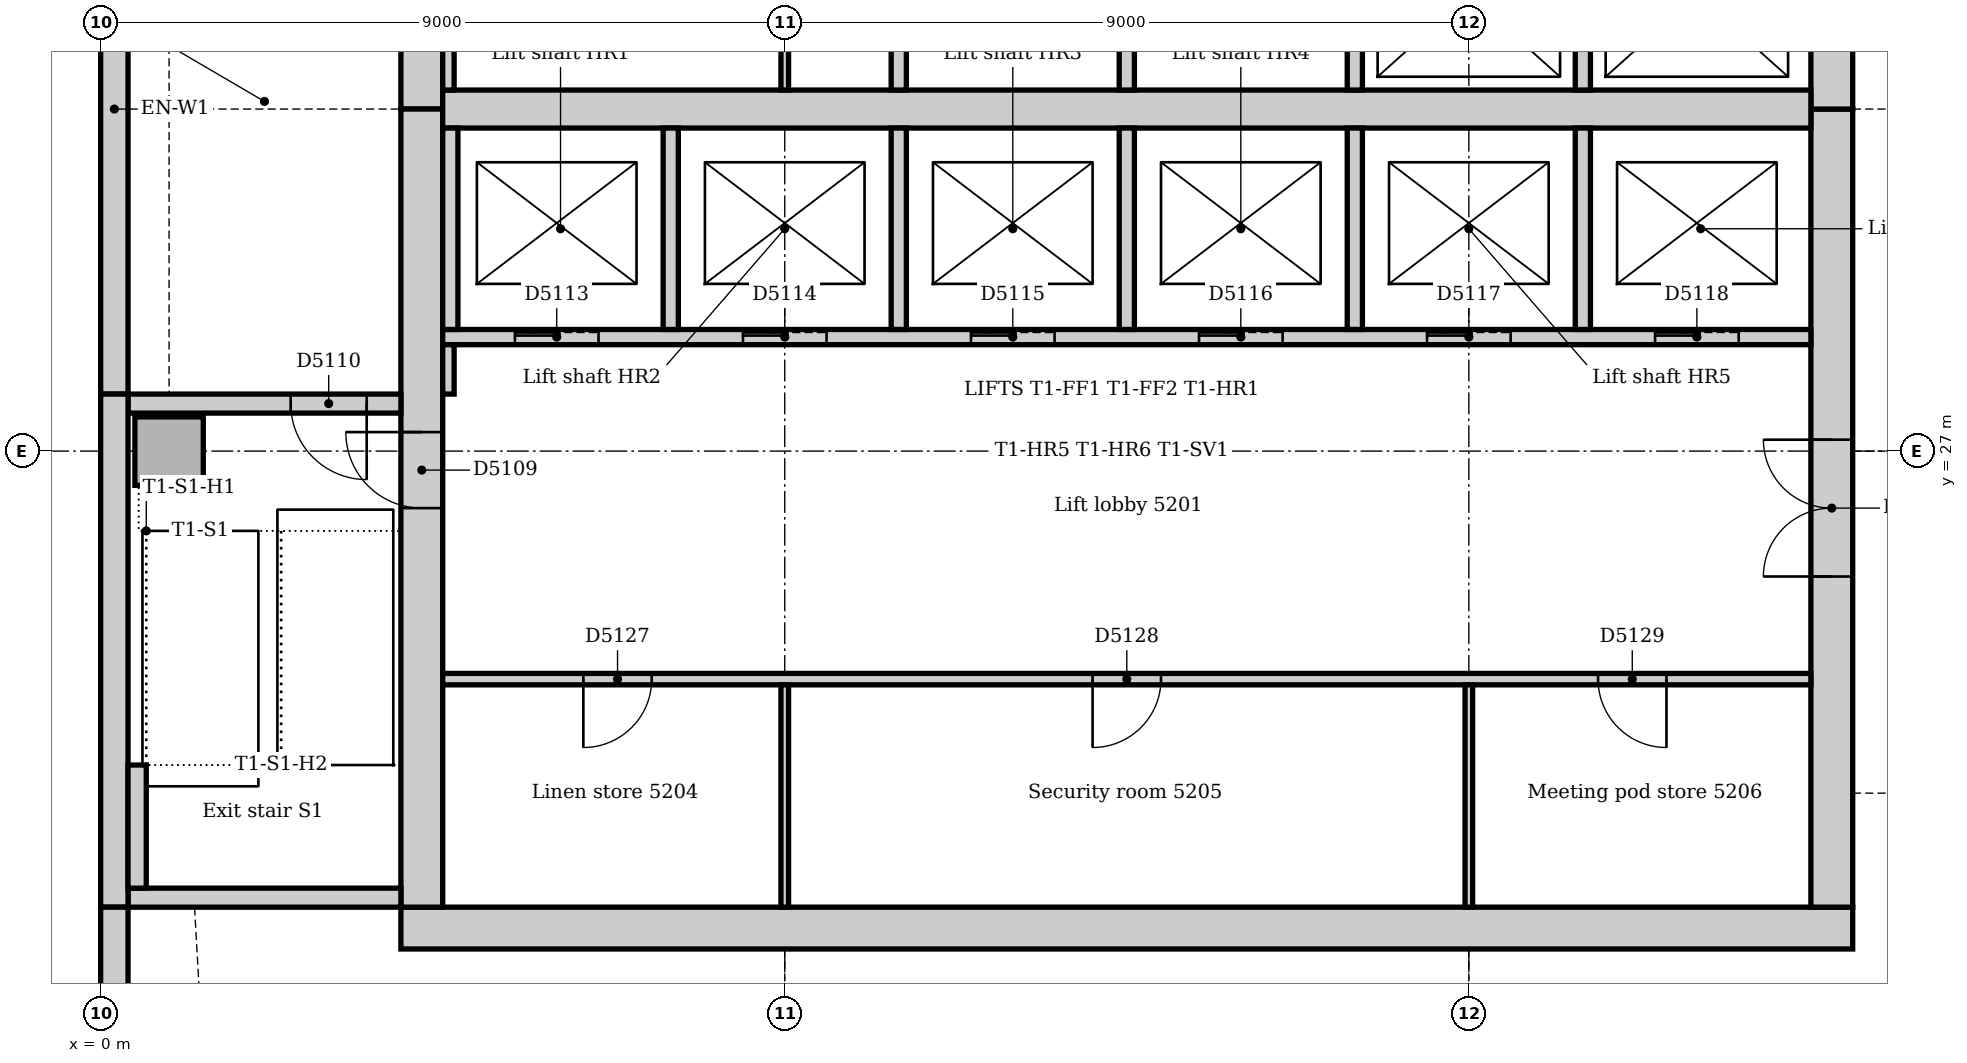
"""IFC4 building model, lengths in metres.
Left out: names, types, materials, properties, quantities, classifications, styles, units other than length and angle.
Written with IfcOpenShell. Run it as: python <this file> out.ifc"""

import sys

from ifc_helpers import new_model, si_unit, direction, frame, frame_2d, origin, origin_2d, place, context, subcontext, project, spatial, rectangle, extrude, element, fill, save


model = new_model("IFC4")
c1 = context("Model", 3, precision=1e-05, world=origin(), true_north=direction((0.0, 1.0)))
c2 = subcontext(c1, "Body", "Model", "MODEL_VIEW")
j1 = project(units=[si_unit("LENGTHUNIT", "METRE"), si_unit("PLANEANGLEUNIT", "RADIAN")], contexts=[c1])
p1 = place(None, origin())
s1 = spatial("IfcSite", under=j1, at=p1, CompositionType="ELEMENT")
p2 = place(p1, origin())
s2 = spatial("IfcBuilding", under=s1, at=p2, CompositionType="ELEMENT")
p3 = place(p2, frame((0.0, 0.0, 218.0)))
s3 = spatial("IfcBuildingStorey", under=s2, at=p3, CompositionType="ELEMENT", Elevation=218.0)
p4 = place(p3, frame((3.95, 20.725, 0.0), z_axis=(0.0, 0.0, 1.0), x_axis=(1.0, 0.0, 0.0)))
e1 = element("IfcWall", 1, at=p4, inside=s3, PredefinedType="SOLIDWALL", context=c2, shape_type="SweptSolid", body=[
    extrude(rectangle(XDim=19.1, YDim=0.55, at=frame_2d((9.55, 0.0))), origin(), (0.0, 0.0, 1.0), 4.0),
])
p5 = place(p3, frame((22.775, 21.0, 0.0), z_axis=(0.0, 0.0, 1.0), x_axis=(0.0, 1.0, 0.0)))
e2 = element("IfcWall", 2, at=p5, inside=s3, PredefinedType="SOLIDWALL", context=c2, shape_type="SweptSolid", body=[
    extrude(rectangle(XDim=10.5, YDim=0.55, at=frame_2d((5.25, 0.0))), origin(), (0.0, 0.0, 1.0), 4.0),
])
p6 = place(p5, frame((4.35, 0.0, 0.0)))
e3 = element("IfcOpeningElement", 3, at=p6, cuts=e2, PredefinedType="OPENING", context=c2, shape_type="SweptSolid", body=[
    extrude(rectangle(XDim=1.8, YDim=2.1, at=frame_2d((0.9, 1.05))), frame((0.0, 0.285, 0.0), z_axis=(0.0, -1.0, 0.0), x_axis=(1.0, 0.0, 0.0)), (0.0, 0.0, 1.0), 0.57),
])
p7 = place(p3, frame((22.775, 31.5, 0.0), z_axis=(0.0, 0.0, 1.0), x_axis=(0.0, 1.0, 0.0)))
e4 = element("IfcWall", 4, at=p7, inside=s3, PredefinedType="SOLIDWALL", context=c2, shape_type="SweptSolid", body=[
    extrude(rectangle(XDim=10.5, YDim=0.55, at=frame_2d((5.25, 0.0))), origin(), (0.0, 0.0, 1.0), 4.0),
])
p8 = place(p7, frame((3.15, 0.0, 0.0)))
e5 = element("IfcOpeningElement", 5, at=p8, cuts=e4, PredefinedType="OPENING", context=c2, shape_type="SweptSolid", body=[
    extrude(rectangle(XDim=1.0, YDim=2.1, at=frame_2d((0.5, 1.05))), frame((0.0, 0.285, 0.0), z_axis=(0.0, -1.0, 0.0), x_axis=(1.0, 0.0, 0.0)), (0.0, 0.0, 1.0), 0.57),
])
p9 = place(p7, frame((5.2, 0.0, 0.0)))
e6 = element("IfcOpeningElement", 6, at=p9, cuts=e4, PredefinedType="OPENING", context=c2, shape_type="SweptSolid", body=[
    extrude(rectangle(XDim=1.0, YDim=2.1, at=frame_2d((0.5, 1.05))), frame((0.0, 0.285, 0.0), z_axis=(0.0, -1.0, 0.0), x_axis=(1.0, 0.0, 0.0)), (0.0, 0.0, 1.0), 0.57),
])
p10 = place(p3, frame((4.225, 42.0, 0.0), z_axis=(0.0, 0.0, 1.0), x_axis=(0.0, -1.0, 0.0)))
e7 = element("IfcWall", 7, at=p10, inside=s3, PredefinedType="SOLIDWALL", context=c2, shape_type="SweptSolid", body=[
    extrude(rectangle(XDim=10.5, YDim=0.55, at=frame_2d((5.25, 0.0))), origin(), (0.0, 0.0, 1.0), 4.0),
])
p11 = place(p10, frame((5.3, 0.0, 0.0)))
e8 = element("IfcOpeningElement", 8, at=p11, cuts=e7, PredefinedType="OPENING", context=c2, shape_type="SweptSolid", body=[
    extrude(rectangle(XDim=1.0, YDim=2.1, at=frame_2d((0.5, 1.05))), frame((0.0, 0.285, 0.0), z_axis=(0.0, -1.0, 0.0), x_axis=(1.0, 0.0, 0.0)), (0.0, 0.0, 1.0), 0.57),
])
p12 = place(p3, frame((4.225, 31.5, 0.0), z_axis=(0.0, 0.0, 1.0), x_axis=(0.0, -1.0, 0.0)))
e9 = element("IfcWall", 9, at=p12, inside=s3, PredefinedType="SOLIDWALL", context=c2, shape_type="SweptSolid", body=[
    extrude(rectangle(XDim=10.5, YDim=0.55, at=frame_2d((5.25, 0.0))), origin(), (0.0, 0.0, 1.0), 4.0),
])
p13 = place(p12, frame((4.25, 0.0, 0.0)))
e10 = element("IfcOpeningElement", 10, at=p13, cuts=e9, PredefinedType="OPENING", context=c2, shape_type="SweptSolid", body=[
    extrude(rectangle(XDim=1.0, YDim=2.1, at=frame_2d((0.5, 1.05))), frame((0.0, 0.285, 0.0), z_axis=(0.0, -1.0, 0.0), x_axis=(1.0, 0.0, 0.0)), (0.0, 0.0, 1.0), 0.57),
])
p14 = place(p3, frame((4.5, 31.5, 0.0), z_axis=(0.0, 0.0, 1.0), x_axis=(1.0, 0.0, 0.0)))
e11 = element("IfcWall", 11, at=p14, inside=s3, PredefinedType="SOLIDWALL", context=c2, shape_type="SweptSolid", body=[
    extrude(rectangle(XDim=18.0, YDim=0.5, at=frame_2d((9.0, 0.0))), origin(), (0.0, 0.0, 1.0), 4.0),
])
p15 = place(p3, frame((0.36, 21.125, 0.0), z_axis=(0.0, 0.0, 1.0), x_axis=(1.0, 0.0, 0.0)))
e12 = element("IfcWall", 12, at=p15, inside=s3, PredefinedType="SOLIDWALL", context=c2, shape_type="SweptSolid", body=[
    extrude(rectangle(XDim=3.59, YDim=0.25, at=frame_2d((1.795, 0.0))), origin(), (0.0, 0.0, 1.0), 4.0),
])
p16 = place(p3, frame((3.95, 27.625, 0.0), z_axis=(0.0, 0.0, 1.0), x_axis=(-1.0, 0.0, 0.0)))
e13 = element("IfcWall", 13, at=p16, inside=s3, PredefinedType="SOLIDWALL", context=c2, shape_type="SweptSolid", body=[
    extrude(rectangle(XDim=3.59, YDim=0.25, at=frame_2d((1.795, 0.0))), origin(), (0.0, 0.0, 1.0), 4.0),
])
p17 = place(p16, frame((0.45, 0.0, 0.0)))
e14 = element("IfcOpeningElement", 14, at=p17, cuts=e13, PredefinedType="OPENING", context=c2, shape_type="SweptSolid", body=[
    extrude(rectangle(XDim=1.0, YDim=2.1, at=frame_2d((0.5, 1.05))), frame((0.0, 0.135, 0.0), z_axis=(0.0, -1.0, 0.0), x_axis=(1.0, 0.0, 0.0)), (0.0, 0.0, 1.0), 0.27),
])
p18 = place(p3, frame((0.9, 27.0, 0.0), z_axis=(0.0, 0.0, 1.0), x_axis=(1.0, 0.0, 0.0)))
e15 = element("IfcColumn", 15, at=p18, inside=s3, PredefinedType="COLUMN", context=c2, shape_type="SweptSolid", body=[
    extrude(rectangle(XDim=0.9, YDim=0.9, at=origin_2d()), origin(), (0.0, 0.0, 1.0), 4.0),
])
p19 = place(p3, frame((0.18, 35.25, 0.0), z_axis=(0.0, 0.0, 1.0), x_axis=(0.0, -1.0, 0.0)))
e16 = element("IfcWall", 16, at=p19, inside=s3, PredefinedType="STANDARD", context=c2, shape_type="SweptSolid", body=[
    extrude(rectangle(XDim=7.5, YDim=0.36, at=frame_2d((3.75, 0.0))), origin(), (0.0, 0.0, 1.0), 3.85),
])
p20 = place(p3, frame((0.18, 27.75, 0.0), z_axis=(0.0, 0.0, 1.0), x_axis=(0.0, -1.0, 0.0)))
e17 = element("IfcWall", 17, at=p20, inside=s3, PredefinedType="STANDARD", context=c2, shape_type="SweptSolid", body=[
    extrude(rectangle(XDim=6.75, YDim=0.36, at=frame_2d((3.375, 0.0))), origin(), (0.0, 0.0, 1.0), 3.85),
])
p21 = place(p3, frame((0.18, 21.0, 0.0), z_axis=(0.0, 0.0, 1.0), x_axis=(0.0, -1.0, 0.0)))
e18 = element("IfcWall", 18, at=p21, inside=s3, PredefinedType="STANDARD", context=c2, shape_type="SweptSolid", body=[
    extrude(rectangle(XDim=3.257, YDim=0.36, at=frame_2d((1.629, 0.0))), origin(), (0.0, 0.0, 1.0), 3.85),
])
p22 = place(p3, frame((0.48, 21.25, 0.0), z_axis=(0.0, 0.0, 1.0), x_axis=(0.0, 1.0, 0.0)))
e19 = element("IfcWall", 19, at=p22, inside=s3, PredefinedType="STANDARD", context=c2, shape_type="SweptSolid", body=[
    extrude(rectangle(XDim=1.62, YDim=0.24, at=frame_2d((0.81, 0.0))), origin(), (0.0, 0.0, 1.0), 4.0),
])
p23 = place(p3, frame((4.5, 28.5, 0.0), z_axis=(0.0, 0.0, 1.0), x_axis=(1.0, 0.0, 0.0)))
e20 = element("IfcWall", 20, at=p23, inside=s3, PredefinedType="PARTITIONING", context=c2, shape_type="SweptSolid", body=[
    extrude(rectangle(XDim=18.0, YDim=0.2, at=frame_2d((9.0, 0.0))), origin(), (0.0, 0.0, 1.0), 3.85),
])
p24 = place(p23, frame((0.95, 0.0, 0.0)))
e21 = element("IfcOpeningElement", 21, at=p24, cuts=e20, PredefinedType="OPENING", context=c2, shape_type="SweptSolid", body=[
    extrude(rectangle(XDim=1.1, YDim=2.1, at=frame_2d((0.55, 1.05))), frame((0.0, 0.11, 0.0), z_axis=(0.0, -1.0, 0.0), x_axis=(1.0, 0.0, 0.0)), (0.0, 0.0, 1.0), 0.22),
])
p25 = place(p23, frame((3.95, 0.0, 0.0)))
e22 = element("IfcOpeningElement", 22, at=p25, cuts=e20, PredefinedType="OPENING", context=c2, shape_type="SweptSolid", body=[
    extrude(rectangle(XDim=1.1, YDim=2.1, at=frame_2d((0.55, 1.05))), frame((0.0, 0.11, 0.0), z_axis=(0.0, -1.0, 0.0), x_axis=(1.0, 0.0, 0.0)), (0.0, 0.0, 1.0), 0.22),
])
p26 = place(p23, frame((6.95, 0.0, 0.0)))
e23 = element("IfcOpeningElement", 23, at=p26, cuts=e20, PredefinedType="OPENING", context=c2, shape_type="SweptSolid", body=[
    extrude(rectangle(XDim=1.1, YDim=2.1, at=frame_2d((0.55, 1.05))), frame((0.0, 0.11, 0.0), z_axis=(0.0, -1.0, 0.0), x_axis=(1.0, 0.0, 0.0)), (0.0, 0.0, 1.0), 0.22),
])
p27 = place(p23, frame((9.95, 0.0, 0.0)))
e24 = element("IfcOpeningElement", 24, at=p27, cuts=e20, PredefinedType="OPENING", context=c2, shape_type="SweptSolid", body=[
    extrude(rectangle(XDim=1.1, YDim=2.1, at=frame_2d((0.55, 1.05))), frame((0.0, 0.11, 0.0), z_axis=(0.0, -1.0, 0.0), x_axis=(1.0, 0.0, 0.0)), (0.0, 0.0, 1.0), 0.22),
])
p28 = place(p23, frame((12.95, 0.0, 0.0)))
e25 = element("IfcOpeningElement", 25, at=p28, cuts=e20, PredefinedType="OPENING", context=c2, shape_type="SweptSolid", body=[
    extrude(rectangle(XDim=1.1, YDim=2.1, at=frame_2d((0.55, 1.05))), frame((0.0, 0.11, 0.0), z_axis=(0.0, -1.0, 0.0), x_axis=(1.0, 0.0, 0.0)), (0.0, 0.0, 1.0), 0.22),
])
p29 = place(p23, frame((15.95, 0.0, 0.0)))
e26 = element("IfcOpeningElement", 26, at=p29, cuts=e20, PredefinedType="OPENING", context=c2, shape_type="SweptSolid", body=[
    extrude(rectangle(XDim=1.1, YDim=2.1, at=frame_2d((0.55, 1.05))), frame((0.0, 0.11, 0.0), z_axis=(0.0, -1.0, 0.0), x_axis=(1.0, 0.0, 0.0)), (0.0, 0.0, 1.0), 0.22),
])
for number, where, z_axis, x_axis in (
    (27, (10.5, 28.6, 0.0), (0.0, 0.0, 1.0), (0.0, 1.0, 0.0)),
    (28, (10.5, 31.75, 0.0), (0.0, 0.0, 1.0), (0.0, 1.0, 0.0)),
    (29, (13.5, 28.6, 0.0), (0.0, 0.0, 1.0), (0.0, 1.0, 0.0)),
    (30, (13.5, 31.75, 0.0), (0.0, 0.0, 1.0), (0.0, 1.0, 0.0)),
    (31, (16.5, 28.6, 0.0), (0.0, 0.0, 1.0), (0.0, 1.0, 0.0)),
    (32, (16.5, 31.75, 0.0), (0.0, 0.0, 1.0), (0.0, 1.0, 0.0)),
    (33, (19.5, 28.6, 0.0), (0.0, 0.0, 1.0), (0.0, 1.0, 0.0)),
    (34, (19.5, 31.75, 0.0), (0.0, 0.0, 1.0), (0.0, 1.0, 0.0)),
    (35, (4.6, 28.6, 0.0), (0.0, 0.0, 1.0), (0.0, 1.0, 0.0)),
    (36, (7.5, 28.6, 0.0), (0.0, 0.0, 1.0), (0.0, 1.0, 0.0)),
):
    element("IfcWall", number, at=place(p3, frame(where, z_axis=z_axis, x_axis=x_axis)), inside=s3, PredefinedType="PARTITIONING", context=c2, shape_type="SweptSolid", body=[
        extrude(rectangle(XDim=2.65, YDim=0.2, at=frame_2d((1.325, 0.0))), origin(), (0.0, 0.0, 1.0), 3.85),
    ])
p30 = place(p3, frame((4.5, 24.0, 0.0), z_axis=(0.0, 0.0, 1.0), x_axis=(1.0, 0.0, 0.0)))
e37 = element("IfcWall", 37, at=p30, inside=s3, PredefinedType="PARTITIONING", context=c2, shape_type="SweptSolid", body=[
    extrude(rectangle(XDim=18.0, YDim=0.15, at=frame_2d((9.0, 0.0))), origin(), (0.0, 0.0, 1.0), 3.85),
])
p31 = place(p30, frame((1.85, 0.0, 0.0)))
e38 = element("IfcOpeningElement", 38, at=p31, cuts=e37, PredefinedType="OPENING", context=c2, shape_type="SweptSolid", body=[
    extrude(rectangle(XDim=0.9, YDim=2.1, at=frame_2d((0.45, 1.05))), frame((0.0, 0.085, 0.0), z_axis=(0.0, -1.0, 0.0), x_axis=(1.0, 0.0, 0.0)), (0.0, 0.0, 1.0), 0.17),
])
p32 = place(p30, frame((8.55, 0.0, 0.0)))
e39 = element("IfcOpeningElement", 39, at=p32, cuts=e37, PredefinedType="OPENING", context=c2, shape_type="SweptSolid", body=[
    extrude(rectangle(XDim=0.9, YDim=2.1, at=frame_2d((0.45, 1.05))), frame((0.0, 0.085, 0.0), z_axis=(0.0, -1.0, 0.0), x_axis=(1.0, 0.0, 0.0)), (0.0, 0.0, 1.0), 0.17),
])
p33 = place(p30, frame((15.2, 0.0, 0.0)))
e40 = element("IfcOpeningElement", 40, at=p33, cuts=e37, PredefinedType="OPENING", context=c2, shape_type="SweptSolid", body=[
    extrude(rectangle(XDim=0.9, YDim=2.1, at=frame_2d((0.45, 1.05))), frame((0.0, 0.085, 0.0), z_axis=(0.0, -1.0, 0.0), x_axis=(1.0, 0.0, 0.0)), (0.0, 0.0, 1.0), 0.17),
])
p34 = place(p3, frame((4.575, 31.75, 0.0), z_axis=(0.0, 0.0, 1.0), x_axis=(0.0, 1.0, 0.0)))
e41 = element("IfcWall", 41, at=p34, inside=s3, PredefinedType="PARTITIONING", context=c2, shape_type="SweptSolid", body=[
    extrude(rectangle(XDim=2.675, YDim=0.15, at=frame_2d((1.337, 0.0))), origin(), (0.0, 0.0, 1.0), 3.85),
])
p35 = place(p3, frame((4.575, 27.75, 0.0), z_axis=(0.0, 0.0, 1.0), x_axis=(0.0, 1.0, 0.0)))
e42 = element("IfcWall", 42, at=p35, inside=s3, PredefinedType="PARTITIONING", context=c2, shape_type="SweptSolid", body=[
    extrude(rectangle(XDim=0.65, YDim=0.15, at=frame_2d((0.325, 0.0))), origin(), (0.0, 0.0, 1.0), 3.85),
])
p36 = place(p3, frame((9.0, 21.0, 0.0), z_axis=(0.0, 0.0, 1.0), x_axis=(0.0, 1.0, 0.0)))
e43 = element("IfcWall", 43, at=p36, inside=s3, PredefinedType="PARTITIONING", context=c2, shape_type="SweptSolid", body=[
    extrude(rectangle(XDim=2.925, YDim=0.1, at=frame_2d((1.462, 0.0))), origin(), (0.0, 0.0, 1.0), 3.85),
])
p37 = place(p3, frame((9.0, 31.75, 0.0), z_axis=(0.0, 0.0, 1.0), x_axis=(0.0, 1.0, 0.0)))
e44 = element("IfcWall", 44, at=p37, inside=s3, PredefinedType="PARTITIONING", context=c2, shape_type="SweptSolid", body=[
    extrude(rectangle(XDim=2.675, YDim=0.1, at=frame_2d((1.337, 0.0))), origin(), (0.0, 0.0, 1.0), 3.85),
])
p38 = place(p3, frame((18.0, 21.0, 0.0), z_axis=(0.0, 0.0, 1.0), x_axis=(0.0, 1.0, 0.0)))
e45 = element("IfcWall", 45, at=p38, inside=s3, PredefinedType="PARTITIONING", context=c2, shape_type="SweptSolid", body=[
    extrude(rectangle(XDim=2.925, YDim=0.1, at=frame_2d((1.462, 0.0))), origin(), (0.0, 0.0, 1.0), 3.85),
])
p39 = place(p13, frame((1.0, 0.0, 0.0), z_axis=(0.0, 0.0, 1.0), x_axis=(-1.0, 0.0, 0.0)))
e46 = element("IfcDoor", 46, at=p39, inside=s3, OperationType="SINGLE_SWING_RIGHT", PredefinedType="DOOR", context=c2, shape_type="SweptSolid", body=[
    extrude(rectangle(XDim=1.0, YDim=2.1, at=frame_2d((0.5, 1.05))), frame((0.0, 0.025, 0.0), z_axis=(0.0, -1.0, 0.0), x_axis=(1.0, 0.0, 0.0)), (0.0, 0.0, 1.0), 0.05),
])
fill(e10, e46)
p40 = place(p17, origin())
e47 = element("IfcDoor", 47, at=p40, inside=s3, OperationType="SINGLE_SWING_LEFT", PredefinedType="DOOR", context=c2, shape_type="SweptSolid", body=[
    extrude(rectangle(XDim=1.0, YDim=2.1, at=frame_2d((0.5, 1.05))), frame((0.0, 0.025, 0.0), z_axis=(0.0, -1.0, 0.0), x_axis=(1.0, 0.0, 0.0)), (0.0, 0.0, 1.0), 0.05),
])
fill(e14, e47)
p41 = place(p24, origin())
e48 = element("IfcDoor", 48, at=p41, inside=s3, OperationType="SLIDING_TO_LEFT", PredefinedType="DOOR", context=c2, shape_type="SweptSolid", body=[
    extrude(rectangle(XDim=1.1, YDim=2.1, at=frame_2d((0.55, 1.05))), frame((0.0, 0.025, 0.0), z_axis=(0.0, -1.0, 0.0), x_axis=(1.0, 0.0, 0.0)), (0.0, 0.0, 1.0), 0.05),
])
fill(e21, e48)
p42 = place(p25, origin())
e49 = element("IfcDoor", 49, at=p42, inside=s3, OperationType="SLIDING_TO_LEFT", PredefinedType="DOOR", context=c2, shape_type="SweptSolid", body=[
    extrude(rectangle(XDim=1.1, YDim=2.1, at=frame_2d((0.55, 1.05))), frame((0.0, 0.025, 0.0), z_axis=(0.0, -1.0, 0.0), x_axis=(1.0, 0.0, 0.0)), (0.0, 0.0, 1.0), 0.05),
])
fill(e22, e49)
p43 = place(p26, origin())
e50 = element("IfcDoor", 50, at=p43, inside=s3, OperationType="SLIDING_TO_LEFT", PredefinedType="DOOR", context=c2, shape_type="SweptSolid", body=[
    extrude(rectangle(XDim=1.1, YDim=2.1, at=frame_2d((0.55, 1.05))), frame((0.0, 0.025, 0.0), z_axis=(0.0, -1.0, 0.0), x_axis=(1.0, 0.0, 0.0)), (0.0, 0.0, 1.0), 0.05),
])
fill(e23, e50)
p44 = place(p27, origin())
e51 = element("IfcDoor", 51, at=p44, inside=s3, OperationType="SLIDING_TO_LEFT", PredefinedType="DOOR", context=c2, shape_type="SweptSolid", body=[
    extrude(rectangle(XDim=1.1, YDim=2.1, at=frame_2d((0.55, 1.05))), frame((0.0, 0.025, 0.0), z_axis=(0.0, -1.0, 0.0), x_axis=(1.0, 0.0, 0.0)), (0.0, 0.0, 1.0), 0.05),
])
fill(e24, e51)
p45 = place(p28, origin())
e52 = element("IfcDoor", 52, at=p45, inside=s3, OperationType="SLIDING_TO_LEFT", PredefinedType="DOOR", context=c2, shape_type="SweptSolid", body=[
    extrude(rectangle(XDim=1.1, YDim=2.1, at=frame_2d((0.55, 1.05))), frame((0.0, 0.025, 0.0), z_axis=(0.0, -1.0, 0.0), x_axis=(1.0, 0.0, 0.0)), (0.0, 0.0, 1.0), 0.05),
])
fill(e25, e52)
p46 = place(p29, origin())
e53 = element("IfcDoor", 53, at=p46, inside=s3, OperationType="SLIDING_TO_LEFT", PredefinedType="DOOR", context=c2, shape_type="SweptSolid", body=[
    extrude(rectangle(XDim=1.1, YDim=2.1, at=frame_2d((0.55, 1.05))), frame((0.0, 0.025, 0.0), z_axis=(0.0, -1.0, 0.0), x_axis=(1.0, 0.0, 0.0)), (0.0, 0.0, 1.0), 0.05),
])
fill(e26, e53)
p47 = place(p6, origin())
e54 = element("IfcDoor", 54, at=p47, inside=s3, OperationType="DOUBLE_DOOR_DOUBLE_SWING", PredefinedType="DOOR", context=c2, shape_type="SweptSolid", body=[
    extrude(rectangle(XDim=1.8, YDim=2.1, at=frame_2d((0.9, 1.05))), frame((0.0, 0.025, 0.0), z_axis=(0.0, -1.0, 0.0), x_axis=(1.0, 0.0, 0.0)), (0.0, 0.0, 1.0), 0.05),
])
fill(e3, e54)
p48 = place(p31, frame((0.9, 0.0, 0.0), z_axis=(0.0, 0.0, 1.0), x_axis=(-1.0, 0.0, 0.0)))
e55 = element("IfcDoor", 55, at=p48, inside=s3, OperationType="SINGLE_SWING_RIGHT", PredefinedType="DOOR", context=c2, shape_type="SweptSolid", body=[
    extrude(rectangle(XDim=0.9, YDim=2.1, at=frame_2d((0.45, 1.05))), frame((0.0, 0.025, 0.0), z_axis=(0.0, -1.0, 0.0), x_axis=(1.0, 0.0, 0.0)), (0.0, 0.0, 1.0), 0.05),
])
fill(e38, e55)
p49 = place(p32, frame((0.9, 0.0, 0.0), z_axis=(0.0, 0.0, 1.0), x_axis=(-1.0, 0.0, 0.0)))
e56 = element("IfcDoor", 56, at=p49, inside=s3, OperationType="SINGLE_SWING_RIGHT", PredefinedType="DOOR", context=c2, shape_type="SweptSolid", body=[
    extrude(rectangle(XDim=0.9, YDim=2.1, at=frame_2d((0.45, 1.05))), frame((0.0, 0.025, 0.0), z_axis=(0.0, -1.0, 0.0), x_axis=(1.0, 0.0, 0.0)), (0.0, 0.0, 1.0), 0.05),
])
fill(e39, e56)
p50 = place(p33, frame((0.9, 0.0, 0.0), z_axis=(0.0, 0.0, 1.0), x_axis=(-1.0, 0.0, 0.0)))
e57 = element("IfcDoor", 57, at=p50, inside=s3, OperationType="SINGLE_SWING_LEFT", PredefinedType="DOOR", context=c2, shape_type="SweptSolid", body=[
    extrude(rectangle(XDim=0.9, YDim=2.1, at=frame_2d((0.45, 1.05))), frame((0.0, 0.025, 0.0), z_axis=(0.0, -1.0, 0.0), x_axis=(1.0, 0.0, 0.0)), (0.0, 0.0, 1.0), 0.05),
])
fill(e40, e57)
save(model, sys.argv[1])
